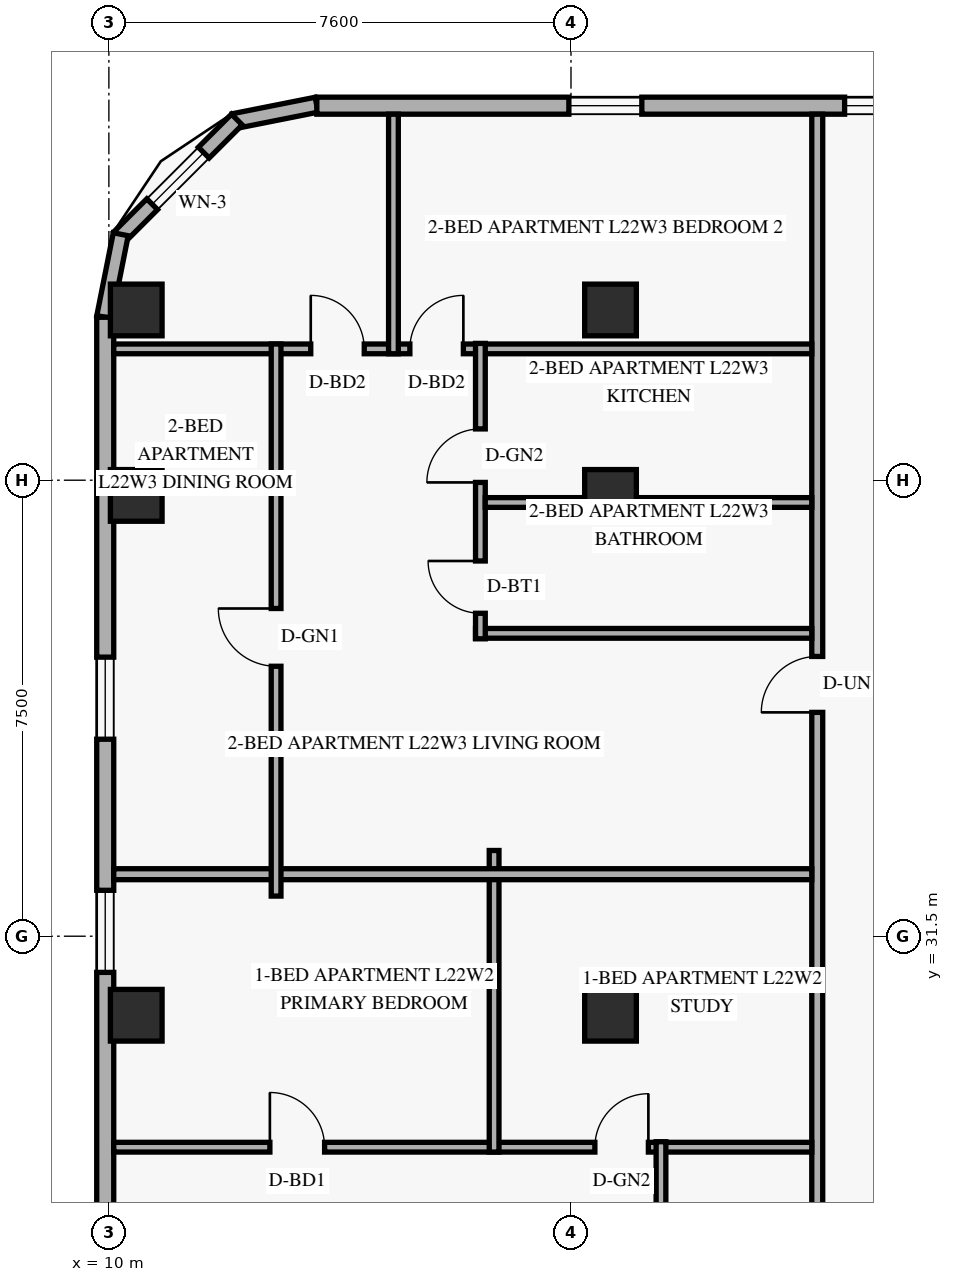
"""IFC4 building model, lengths in metres.
Left out: names, types, materials, properties, quantities, classifications, styles, units other than length and angle.
Written with IfcOpenShell. Run it as: python <this file> out.ifc"""

import sys

from ifc_helpers import new_model, si_unit, direction, frame, frame_2d, origin, origin_2d, place, context, subcontext, project, spatial, rectangle, extrude, element, fill, save


model = new_model("IFC4")
c1 = context("Model", 3, precision=1e-05, world=origin(), true_north=direction((0.0, 1.0)))
c2 = subcontext(c1, "Body", "Model", "MODEL_VIEW")
j1 = project(units=[si_unit("LENGTHUNIT", "METRE"), si_unit("PLANEANGLEUNIT", "RADIAN")], contexts=[c1])
p1 = place(None, origin())
s1 = spatial("IfcSite", under=j1, at=p1, CompositionType="ELEMENT")
p2 = place(p1, origin())
s2 = spatial("IfcBuilding", under=s1, at=p2, CompositionType="ELEMENT")
p3 = place(p2, frame((0.0, 0.0, 87.6)))
s3 = spatial("IfcBuildingStorey", under=s2, at=p3, CompositionType="ELEMENT", Elevation=87.6)
for number, where, z_axis, x_axis in (
    (1, (10.45, 30.2, 0.0), (0.0, 0.0, 1.0), (1.0, 0.0, 0.0)),
    (2, (10.45, 38.75, 0.0), (0.0, 0.0, 1.0), (1.0, 0.0, 0.0)),
    (3, (10.45, 41.8, 0.0), (0.0, 0.0, 1.0), (1.0, 0.0, 0.0)),
    (4, (18.25, 30.2, 0.0), (0.0, 0.0, 1.0), (1.0, 0.0, 0.0)),
    (5, (18.25, 38.75, 0.0), (0.0, 0.0, 1.0), (1.0, 0.0, 0.0)),
    (6, (18.25, 41.8, 0.0), (0.0, 0.0, 1.0), (1.0, 0.0, 0.0)),
):
    element("IfcColumn", number, at=place(p3, frame(where, z_axis=z_axis, x_axis=x_axis)), inside=s3, PredefinedType="COLUMN", context=c2, shape_type="SweptSolid", body=[
        extrude(rectangle(XDim=0.85, YDim=0.85, at=origin_2d()), origin(), (0.0, 0.0, 1.0), 3.6),
    ])
p4 = place(p3, frame((13.417, 45.176, 0.0), z_axis=(0.0, 0.0, 1.0), x_axis=(-0.980809899341, -0.19496651342, 0.0)))
e7 = element("IfcWall", 7, at=p4, inside=s3, PredefinedType="SOLIDWALL", context=c2, shape_type="SweptSolid", body=[
    extrude(rectangle(XDim=1.389, YDim=0.25, at=frame_2d((0.694, 0.0))), origin(), (0.0, 0.0, 1.0), 3.36),
])
p5 = place(p3, frame((12.105, 44.932, 0.0), z_axis=(0.0, 0.0, 1.0), x_axis=(-0.707151344399, -0.707062215165, 0.0)))
e8 = element("IfcWall", 8, at=p5, inside=s3, PredefinedType="SOLIDWALL", context=c2, shape_type="SweptSolid", body=[
    extrude(rectangle(XDim=2.739, YDim=0.25, at=frame_2d((1.37, 0.0))), origin(), (0.0, 0.0, 1.0), 3.36),
])
p6 = place(p5, frame((0.77, 0.0, 0.85)))
e9 = element("IfcOpeningElement", 9, at=p6, cuts=e8, PredefinedType="OPENING", context=c2, shape_type="SweptSolid", body=[
    extrude(rectangle(XDim=1.2, YDim=1.5, at=frame_2d((0.6, 0.75))), frame((0.0, 0.135, 0.0), z_axis=(0.0, -1.0, 0.0), x_axis=(1.0, 0.0, 0.0)), (0.0, 0.0, 1.0), 0.27),
])
p7 = place(p3, frame((10.195, 43.045, 0.0), z_axis=(0.0, 0.0, 1.0), x_axis=(-0.195000137217, -0.980803214965, 0.0)))
e10 = element("IfcWall", 10, at=p7, inside=s3, PredefinedType="SOLIDWALL", context=c2, shape_type="SweptSolid", body=[
    extrude(rectangle(XDim=1.388, YDim=0.25, at=frame_2d((0.694, 0.0))), origin(), (0.0, 0.0, 1.0), 3.36),
])
p8 = place(p3, frame((49.98, 45.16, 0.0), z_axis=(0.0, 0.0, 1.0), x_axis=(-1.0, 0.0, 0.0)))
e11 = element("IfcWall", 11, at=p8, inside=s3, PredefinedType="SOLIDWALL", context=c2, shape_type="SweptSolid", body=[
    extrude(rectangle(XDim=36.56, YDim=0.28, at=frame_2d((18.28, 0.0))), origin(), (0.0, 0.0, 1.0), 3.36),
])
p9 = place(p8, frame((31.215, 0.0, 0.85)))
e12 = element("IfcOpeningElement", 12, at=p9, cuts=e11, PredefinedType="OPENING", context=c2, shape_type="SweptSolid", body=[
    extrude(rectangle(XDim=1.2, YDim=1.5, at=frame_2d((0.6, 0.75))), frame((0.0, 0.15, 0.0), z_axis=(0.0, -1.0, 0.0), x_axis=(1.0, 0.0, 0.0)), (0.0, 0.0, 1.0), 0.3),
])
p10 = place(p8, frame((26.68, 0.0, 0.85)))
e13 = element("IfcOpeningElement", 13, at=p10, cuts=e11, PredefinedType="OPENING", context=c2, shape_type="SweptSolid", body=[
    extrude(rectangle(XDim=1.2, YDim=1.5, at=frame_2d((0.6, 0.75))), frame((0.0, 0.15, 0.0), z_axis=(0.0, -1.0, 0.0), x_axis=(1.0, 0.0, 0.0)), (0.0, 0.0, 1.0), 0.3),
])
p11 = place(p8, frame((22.829, 0.0, 0.85)))
e14 = element("IfcOpeningElement", 14, at=p11, cuts=e11, PredefinedType="OPENING", context=c2, shape_type="SweptSolid", body=[
    extrude(rectangle(XDim=1.2, YDim=1.5, at=frame_2d((0.6, 0.75))), frame((0.0, 0.15, 0.0), z_axis=(0.0, -1.0, 0.0), x_axis=(1.0, 0.0, 0.0)), (0.0, 0.0, 1.0), 0.3),
])
p12 = place(p8, frame((16.994, 0.0, 0.85)))
e15 = element("IfcOpeningElement", 15, at=p12, cuts=e11, PredefinedType="OPENING", context=c2, shape_type="SweptSolid", body=[
    extrude(rectangle(XDim=1.2, YDim=1.5, at=frame_2d((0.6, 0.75))), frame((0.0, 0.15, 0.0), z_axis=(0.0, -1.0, 0.0), x_axis=(1.0, 0.0, 0.0)), (0.0, 0.0, 1.0), 0.3),
])
p13 = place(p8, frame((12.895, 0.0, 0.85)))
e16 = element("IfcOpeningElement", 16, at=p13, cuts=e11, PredefinedType="OPENING", context=c2, shape_type="SweptSolid", body=[
    extrude(rectangle(XDim=1.2, YDim=1.5, at=frame_2d((0.6, 0.75))), frame((0.0, 0.15, 0.0), z_axis=(0.0, -1.0, 0.0), x_axis=(1.0, 0.0, 0.0)), (0.0, 0.0, 1.0), 0.3),
])
p14 = place(p8, frame((7.833, 0.0, 0.85)))
e17 = element("IfcOpeningElement", 17, at=p14, cuts=e11, PredefinedType="OPENING", context=c2, shape_type="SweptSolid", body=[
    extrude(rectangle(XDim=1.2, YDim=1.5, at=frame_2d((0.6, 0.75))), frame((0.0, 0.15, 0.0), z_axis=(0.0, -1.0, 0.0), x_axis=(1.0, 0.0, 0.0)), (0.0, 0.0, 1.0), 0.3),
])
p15 = place(p8, frame((1.617, 0.0, 0.85)))
e18 = element("IfcOpeningElement", 18, at=p15, cuts=e11, PredefinedType="OPENING", context=c2, shape_type="SweptSolid", body=[
    extrude(rectangle(XDim=1.2, YDim=1.5, at=frame_2d((0.6, 0.75))), frame((0.0, 0.15, 0.0), z_axis=(0.0, -1.0, 0.0), x_axis=(1.0, 0.0, 0.0)), (0.0, 0.0, 1.0), 0.3),
])
p16 = place(p3, frame((9.94, 41.68, 0.0), z_axis=(0.0, 0.0, 1.0), x_axis=(0.0, -1.0, 0.0)))
e19 = element("IfcWall", 19, at=p16, inside=s3, PredefinedType="SOLIDWALL", context=c2, shape_type="SweptSolid", body=[
    extrude(rectangle(XDim=35.36, YDim=0.28, at=frame_2d((17.68, 0.0))), origin(), (0.0, 0.0, 1.0), 3.36),
])
p17 = place(p16, frame((27.605, 0.0, 0.85)))
e20 = element("IfcOpeningElement", 20, at=p17, cuts=e19, PredefinedType="OPENING", context=c2, shape_type="SweptSolid", body=[
    extrude(rectangle(XDim=1.35, YDim=1.55, at=frame_2d((0.675, 0.775))), frame((0.0, 0.15, 0.0), z_axis=(0.0, -1.0, 0.0), x_axis=(1.0, 0.0, 0.0)), (0.0, 0.0, 1.0), 0.3),
])
p18 = place(p16, frame((21.356, 0.0, 0.85)))
e21 = element("IfcOpeningElement", 21, at=p18, cuts=e19, PredefinedType="OPENING", context=c2, shape_type="SweptSolid", body=[
    extrude(rectangle(XDim=1.35, YDim=1.55, at=frame_2d((0.675, 0.775))), frame((0.0, 0.15, 0.0), z_axis=(0.0, -1.0, 0.0), x_axis=(1.0, 0.0, 0.0)), (0.0, 0.0, 1.0), 0.3),
])
p19 = place(p16, frame((16.359, 0.0, 0.85)))
e22 = element("IfcOpeningElement", 22, at=p19, cuts=e19, PredefinedType="OPENING", context=c2, shape_type="SweptSolid", body=[
    extrude(rectangle(XDim=1.35, YDim=1.55, at=frame_2d((0.675, 0.775))), frame((0.0, 0.15, 0.0), z_axis=(0.0, -1.0, 0.0), x_axis=(1.0, 0.0, 0.0)), (0.0, 0.0, 1.0), 0.3),
])
p20 = place(p16, frame((9.425, 0.0, 0.85)))
e23 = element("IfcOpeningElement", 23, at=p20, cuts=e19, PredefinedType="OPENING", context=c2, shape_type="SweptSolid", body=[
    extrude(rectangle(XDim=1.35, YDim=1.55, at=frame_2d((0.675, 0.775))), frame((0.0, 0.15, 0.0), z_axis=(0.0, -1.0, 0.0), x_axis=(1.0, 0.0, 0.0)), (0.0, 0.0, 1.0), 0.3),
])
p21 = place(p16, frame((5.59, 0.0, 0.85)))
e24 = element("IfcOpeningElement", 24, at=p21, cuts=e19, PredefinedType="OPENING", context=c2, shape_type="SweptSolid", body=[
    extrude(rectangle(XDim=1.35, YDim=1.55, at=frame_2d((0.675, 0.775))), frame((0.0, 0.15, 0.0), z_axis=(0.0, -1.0, 0.0), x_axis=(1.0, 0.0, 0.0)), (0.0, 0.0, 1.0), 0.3),
])
p22 = place(p3, frame((21.65, 2.98, 0.0), z_axis=(0.0, 0.0, 1.0), x_axis=(0.0, 1.0, 0.0)))
e25 = element("IfcWall", 25, at=p22, inside=s3, PredefinedType="STANDARD", context=c2, shape_type="SweptSolid", body=[
    extrude(rectangle(XDim=42.04, YDim=0.18, at=frame_2d((21.02, 0.0))), origin(), (0.0, 0.0, 1.0), 2.731),
])
p23 = place(p22, frame((9.116, 0.0, 0.0)))
e26 = element("IfcOpeningElement", 26, at=p23, cuts=e25, PredefinedType="OPENING", context=c2, shape_type="SweptSolid", body=[
    extrude(rectangle(XDim=0.92, YDim=2.15, at=frame_2d((0.46, 1.075))), frame((0.0, 0.1, 0.0), z_axis=(0.0, -1.0, 0.0), x_axis=(1.0, 0.0, 0.0)), (0.0, 0.0, 1.0), 0.2),
])
p24 = place(p22, frame((19.1, 0.0, 0.0)))
e27 = element("IfcOpeningElement", 27, at=p24, cuts=e25, PredefinedType="OPENING", context=c2, shape_type="SweptSolid", body=[
    extrude(rectangle(XDim=0.92, YDim=2.15, at=frame_2d((0.46, 1.075))), frame((0.0, 0.1, 0.0), z_axis=(0.0, -1.0, 0.0), x_axis=(1.0, 0.0, 0.0)), (0.0, 0.0, 1.0), 0.2),
])
p25 = place(p22, frame((32.201, 0.0, 0.0)))
e28 = element("IfcOpeningElement", 28, at=p25, cuts=e25, PredefinedType="OPENING", context=c2, shape_type="SweptSolid", body=[
    extrude(rectangle(XDim=0.92, YDim=2.15, at=frame_2d((0.46, 1.075))), frame((0.0, 0.1, 0.0), z_axis=(0.0, -1.0, 0.0), x_axis=(1.0, 0.0, 0.0)), (0.0, 0.0, 1.0), 0.2),
])
p26 = place(p3, frame((10.08, 28.03, 0.0), z_axis=(0.0, 0.0, 1.0), x_axis=(1.0, 0.0, 0.0)))
e29 = element("IfcWall", 29, at=p26, inside=s3, PredefinedType="PARTITIONING", context=c2, shape_type="SweptSolid", body=[
    extrude(rectangle(XDim=11.48, YDim=0.16, at=frame_2d((5.74, 0.0))), origin(), (0.0, 0.0, 1.0), 2.731),
])
p27 = place(p26, frame((7.913, 0.0, 0.0)))
e30 = element("IfcOpeningElement", 30, at=p27, cuts=e29, PredefinedType="OPENING", context=c2, shape_type="SweptSolid", body=[
    extrude(rectangle(XDim=0.88, YDim=2.12, at=frame_2d((0.44, 1.06))), frame((0.0, 0.09, 0.0), z_axis=(0.0, -1.0, 0.0), x_axis=(1.0, 0.0, 0.0)), (0.0, 0.0, 1.0), 0.18),
])
p28 = place(p26, frame((2.568, 0.0, 0.0)))
e31 = element("IfcOpeningElement", 31, at=p28, cuts=e29, PredefinedType="OPENING", context=c2, shape_type="SweptSolid", body=[
    extrude(rectangle(XDim=0.9, YDim=2.14, at=frame_2d((0.45, 1.07))), frame((0.0, 0.09, 0.0), z_axis=(0.0, -1.0, 0.0), x_axis=(1.0, 0.0, 0.0)), (0.0, 0.0, 1.0), 0.18),
])
p29 = place(p3, frame((19.08, 23.29, 0.0), z_axis=(0.0, 0.0, 1.0), x_axis=(0.0, 1.0, 0.0)))
e32 = element("IfcWall", 32, at=p29, inside=s3, PredefinedType="PLUMBINGWALL", context=c2, shape_type="SweptSolid", body=[
    extrude(rectangle(XDim=4.83, YDim=0.16, at=frame_2d((2.415, 0.0))), origin(), (0.0, 0.0, 1.0), 3.36),
])
p30 = place(p29, frame((0.42, 0.0, 0.0)))
e33 = element("IfcOpeningElement", 33, at=p30, cuts=e32, PredefinedType="OPENING", context=c2, shape_type="SweptSolid", body=[
    extrude(rectangle(XDim=0.86, YDim=2.12, at=frame_2d((0.43, 1.06))), frame((0.0, 0.09, 0.0), z_axis=(0.0, -1.0, 0.0), x_axis=(1.0, 0.0, 0.0)), (0.0, 0.0, 1.0), 0.18),
])
p31 = place(p29, frame((2.559, 0.0, 0.0)))
e34 = element("IfcOpeningElement", 34, at=p31, cuts=e32, PredefinedType="OPENING", context=c2, shape_type="SweptSolid", body=[
    extrude(rectangle(XDim=0.88, YDim=2.12, at=frame_2d((0.44, 1.06))), frame((0.0, 0.09, 0.0), z_axis=(0.0, -1.0, 0.0), x_axis=(1.0, 0.0, 0.0)), (0.0, 0.0, 1.0), 0.18),
])
p32 = place(p3, frame((16.335, 27.95, 0.0), z_axis=(0.0, 0.0, 1.0), x_axis=(0.0, 1.0, 0.0)))
e35 = element("IfcWall", 35, at=p32, inside=s3, PredefinedType="PARTITIONING", context=c2, shape_type="SweptSolid", body=[
    extrude(rectangle(XDim=4.96, YDim=0.16, at=frame_2d((2.48, 0.0))), origin(), (0.0, 0.0, 1.0), 2.731),
])
p33 = place(p3, frame((10.08, 32.52, 0.0), z_axis=(0.0, 0.0, 1.0), x_axis=(1.0, 0.0, 0.0)))
e36 = element("IfcWall", 36, at=p33, inside=s3, PredefinedType="PARTITIONING", context=c2, shape_type="SweptSolid", body=[
    extrude(rectangle(XDim=11.48, YDim=0.18, at=frame_2d((5.74, 0.0))), origin(), (0.0, 0.0, 1.0), 2.731),
])
p34 = place(p3, frame((10.08, 41.16, 0.0), z_axis=(0.0, 0.0, 1.0), x_axis=(1.0, 0.0, 0.0)))
e37 = element("IfcWall", 37, at=p34, inside=s3, PredefinedType="PARTITIONING", context=c2, shape_type="SweptSolid", body=[
    extrude(rectangle(XDim=11.48, YDim=0.16, at=frame_2d((5.74, 0.0))), origin(), (0.0, 0.0, 1.0), 2.731),
])
p35 = place(p34, frame((3.24, 0.0, 0.0)))
e38 = element("IfcOpeningElement", 38, at=p35, cuts=e37, PredefinedType="OPENING", context=c2, shape_type="SweptSolid", body=[
    extrude(rectangle(XDim=0.88, YDim=2.14, at=frame_2d((0.44, 1.07))), frame((0.0, 0.09, 0.0), z_axis=(0.0, -1.0, 0.0), x_axis=(1.0, 0.0, 0.0)), (0.0, 0.0, 1.0), 0.18),
])
p36 = place(p34, frame((4.87, 0.0, 0.0)))
e39 = element("IfcOpeningElement", 39, at=p36, cuts=e37, PredefinedType="OPENING", context=c2, shape_type="SweptSolid", body=[
    extrude(rectangle(XDim=0.88, YDim=2.14, at=frame_2d((0.44, 1.07))), frame((0.0, 0.09, 0.0), z_axis=(0.0, -1.0, 0.0), x_axis=(1.0, 0.0, 0.0)), (0.0, 0.0, 1.0), 0.18),
])
p37 = place(p3, frame((16.03, 36.481, 0.0), z_axis=(0.0, 0.0, 1.0), x_axis=(1.0, 0.0, 0.0)))
e40 = element("IfcWall", 40, at=p37, inside=s3, PredefinedType="PLUMBINGWALL", context=c2, shape_type="SweptSolid", body=[
    extrude(rectangle(XDim=5.53, YDim=0.16, at=frame_2d((2.765, 0.0))), origin(), (0.0, 0.0, 1.0), 2.731),
])
p38 = place(p3, frame((16.11, 36.392, 0.0), z_axis=(0.0, 0.0, 1.0), x_axis=(0.0, 1.0, 0.0)))
e41 = element("IfcWall", 41, at=p38, inside=s3, PredefinedType="PLUMBINGWALL", context=c2, shape_type="SweptSolid", body=[
    extrude(rectangle(XDim=4.858, YDim=0.16, at=frame_2d((2.429, 0.0))), origin(), (0.0, 0.0, 1.0), 2.731),
])
p39 = place(p38, frame((0.42, 0.0, 0.0)))
e42 = element("IfcOpeningElement", 42, at=p39, cuts=e41, PredefinedType="OPENING", context=c2, shape_type="SweptSolid", body=[
    extrude(rectangle(XDim=0.86, YDim=2.12, at=frame_2d((0.43, 1.06))), frame((0.0, 0.09, 0.0), z_axis=(0.0, -1.0, 0.0), x_axis=(1.0, 0.0, 0.0)), (0.0, 0.0, 1.0), 0.18),
])
p40 = place(p38, frame((2.572, 0.0, 0.0)))
e43 = element("IfcOpeningElement", 43, at=p40, cuts=e41, PredefinedType="OPENING", context=c2, shape_type="SweptSolid", body=[
    extrude(rectangle(XDim=0.88, YDim=2.12, at=frame_2d((0.44, 1.06))), frame((0.0, 0.09, 0.0), z_axis=(0.0, -1.0, 0.0), x_axis=(1.0, 0.0, 0.0)), (0.0, 0.0, 1.0), 0.18),
])
p41 = place(p3, frame((16.19, 38.634, 0.0), z_axis=(0.0, 0.0, 1.0), x_axis=(1.0, 0.0, 0.0)))
e44 = element("IfcWall", 44, at=p41, inside=s3, PredefinedType="PLUMBINGWALL", context=c2, shape_type="SweptSolid", body=[
    extrude(rectangle(XDim=5.37, YDim=0.16, at=frame_2d((2.685, 0.0))), origin(), (0.0, 0.0, 1.0), 2.731),
])
p42 = place(p3, frame((12.75, 32.16, 0.0), z_axis=(0.0, 0.0, 1.0), x_axis=(0.0, 1.0, 0.0)))
e45 = element("IfcWall", 45, at=p42, inside=s3, PredefinedType="PARTITIONING", context=c2, shape_type="SweptSolid", body=[
    extrude(rectangle(XDim=9.08, YDim=0.16, at=frame_2d((4.54, 0.0))), origin(), (0.0, 0.0, 1.0), 2.731),
])
p43 = place(p42, frame((3.78, 0.0, 0.0)))
e46 = element("IfcOpeningElement", 46, at=p43, cuts=e45, PredefinedType="OPENING", context=c2, shape_type="SweptSolid", body=[
    extrude(rectangle(XDim=0.95, YDim=2.15, at=frame_2d((0.475, 1.075))), frame((0.0, 0.09, 0.0), z_axis=(0.0, -1.0, 0.0), x_axis=(1.0, 0.0, 0.0)), (0.0, 0.0, 1.0), 0.18),
])
p44 = place(p3, frame((14.68, 41.08, 0.0), z_axis=(0.0, 0.0, 1.0), x_axis=(0.0, 1.0, 0.0)))
e47 = element("IfcWall", 47, at=p44, inside=s3, PredefinedType="PARTITIONING", context=c2, shape_type="SweptSolid", body=[
    extrude(rectangle(XDim=3.94, YDim=0.16, at=frame_2d((1.97, 0.0))), origin(), (0.0, 0.0, 1.0), 2.809),
])
p45 = place(p6, origin())
e48 = element("IfcWindow", 48, at=p45, inside=s3, PartitioningType="SINGLE_PANEL", PredefinedType="WINDOW", context=c2, shape_type="SweptSolid", body=[
    extrude(rectangle(XDim=1.2, YDim=1.5, at=frame_2d((0.6, 0.75))), frame((0.0, 0.03, 0.0), z_axis=(0.0, -1.0, 0.0), x_axis=(1.0, 0.0, 0.0)), (0.0, 0.0, 1.0), 0.06),
])
fill(e9, e48)
p46 = place(p9, origin())
e49 = element("IfcWindow", 49, at=p46, inside=s3, PartitioningType="SINGLE_PANEL", PredefinedType="WINDOW", context=c2, shape_type="SweptSolid", body=[
    extrude(rectangle(XDim=1.2, YDim=1.5, at=frame_2d((0.6, 0.75))), frame((0.0, 0.03, 0.0), z_axis=(0.0, -1.0, 0.0), x_axis=(1.0, 0.0, 0.0)), (0.0, 0.0, 1.0), 0.06),
])
fill(e12, e49)
p47 = place(p10, origin())
e50 = element("IfcWindow", 50, at=p47, inside=s3, PartitioningType="SINGLE_PANEL", PredefinedType="WINDOW", context=c2, shape_type="SweptSolid", body=[
    extrude(rectangle(XDim=1.2, YDim=1.5, at=frame_2d((0.6, 0.75))), frame((0.0, 0.03, 0.0), z_axis=(0.0, -1.0, 0.0), x_axis=(1.0, 0.0, 0.0)), (0.0, 0.0, 1.0), 0.06),
])
fill(e13, e50)
p48 = place(p20, origin())
e51 = element("IfcWindow", 51, at=p48, inside=s3, PartitioningType="SINGLE_PANEL", PredefinedType="WINDOW", context=c2, shape_type="SweptSolid", body=[
    extrude(rectangle(XDim=1.35, YDim=1.55, at=frame_2d((0.675, 0.775))), frame((0.0, 0.03, 0.0), z_axis=(0.0, -1.0, 0.0), x_axis=(1.0, 0.0, 0.0)), (0.0, 0.0, 1.0), 0.06),
])
fill(e23, e51)
p49 = place(p21, origin())
e52 = element("IfcWindow", 52, at=p49, inside=s3, PartitioningType="SINGLE_PANEL", PredefinedType="WINDOW", context=c2, shape_type="SweptSolid", body=[
    extrude(rectangle(XDim=1.35, YDim=1.55, at=frame_2d((0.675, 0.775))), frame((0.0, 0.03, 0.0), z_axis=(0.0, -1.0, 0.0), x_axis=(1.0, 0.0, 0.0)), (0.0, 0.0, 1.0), 0.06),
])
fill(e24, e52)
p50 = place(p27, origin())
e53 = element("IfcDoor", 53, at=p50, inside=s3, OperationType="SINGLE_SWING_RIGHT", PredefinedType="DOOR", context=c2, shape_type="SweptSolid", body=[
    extrude(rectangle(XDim=0.88, YDim=2.12, at=frame_2d((0.44, 1.06))), frame((0.0, 0.025, 0.0), z_axis=(0.0, -1.0, 0.0), x_axis=(1.0, 0.0, 0.0)), (0.0, 0.0, 1.0), 0.05),
])
fill(e30, e53)
p51 = place(p28, origin())
e54 = element("IfcDoor", 54, at=p51, inside=s3, OperationType="SINGLE_SWING_LEFT", PredefinedType="DOOR", context=c2, shape_type="SweptSolid", body=[
    extrude(rectangle(XDim=0.9, YDim=2.14, at=frame_2d((0.45, 1.07))), frame((0.0, 0.025, 0.0), z_axis=(0.0, -1.0, 0.0), x_axis=(1.0, 0.0, 0.0)), (0.0, 0.0, 1.0), 0.05),
])
fill(e31, e54)
p52 = place(p43, origin())
e55 = element("IfcDoor", 55, at=p52, inside=s3, OperationType="SINGLE_SWING_RIGHT", PredefinedType="DOOR", context=c2, shape_type="SweptSolid", body=[
    extrude(rectangle(XDim=0.95, YDim=2.15, at=frame_2d((0.475, 1.075))), frame((0.0, 0.025, 0.0), z_axis=(0.0, -1.0, 0.0), x_axis=(1.0, 0.0, 0.0)), (0.0, 0.0, 1.0), 0.05),
])
fill(e46, e55)
p53 = place(p25, origin())
e56 = element("IfcDoor", 56, at=p53, inside=s3, OperationType="SINGLE_SWING_LEFT", PredefinedType="DOOR", context=c2, shape_type="SweptSolid", body=[
    extrude(rectangle(XDim=0.92, YDim=2.15, at=frame_2d((0.46, 1.075))), frame((0.0, 0.025, 0.0), z_axis=(0.0, -1.0, 0.0), x_axis=(1.0, 0.0, 0.0)), (0.0, 0.0, 1.0), 0.05),
])
fill(e28, e56)
p54 = place(p39, origin())
e57 = element("IfcDoor", 57, at=p54, inside=s3, OperationType="SINGLE_SWING_RIGHT", PredefinedType="DOOR", context=c2, shape_type="SweptSolid", body=[
    extrude(rectangle(XDim=0.86, YDim=2.12, at=frame_2d((0.43, 1.06))), frame((0.0, 0.025, 0.0), z_axis=(0.0, -1.0, 0.0), x_axis=(1.0, 0.0, 0.0)), (0.0, 0.0, 1.0), 0.05),
])
fill(e42, e57)
p55 = place(p40, origin())
e58 = element("IfcDoor", 58, at=p55, inside=s3, OperationType="SINGLE_SWING_LEFT", PredefinedType="DOOR", context=c2, shape_type="SweptSolid", body=[
    extrude(rectangle(XDim=0.88, YDim=2.12, at=frame_2d((0.44, 1.06))), frame((0.0, 0.025, 0.0), z_axis=(0.0, -1.0, 0.0), x_axis=(1.0, 0.0, 0.0)), (0.0, 0.0, 1.0), 0.05),
])
fill(e43, e58)
p56 = place(p35, origin())
e59 = element("IfcDoor", 59, at=p56, inside=s3, OperationType="SINGLE_SWING_LEFT", PredefinedType="DOOR", context=c2, shape_type="SweptSolid", body=[
    extrude(rectangle(XDim=0.88, YDim=2.14, at=frame_2d((0.44, 1.07))), frame((0.0, 0.025, 0.0), z_axis=(0.0, -1.0, 0.0), x_axis=(1.0, 0.0, 0.0)), (0.0, 0.0, 1.0), 0.05),
])
fill(e38, e59)
p57 = place(p36, origin())
e60 = element("IfcDoor", 60, at=p57, inside=s3, OperationType="SINGLE_SWING_RIGHT", PredefinedType="DOOR", context=c2, shape_type="SweptSolid", body=[
    extrude(rectangle(XDim=0.88, YDim=2.14, at=frame_2d((0.44, 1.07))), frame((0.0, 0.025, 0.0), z_axis=(0.0, -1.0, 0.0), x_axis=(1.0, 0.0, 0.0)), (0.0, 0.0, 1.0), 0.05),
])
fill(e39, e60)
save(model, sys.argv[1])
